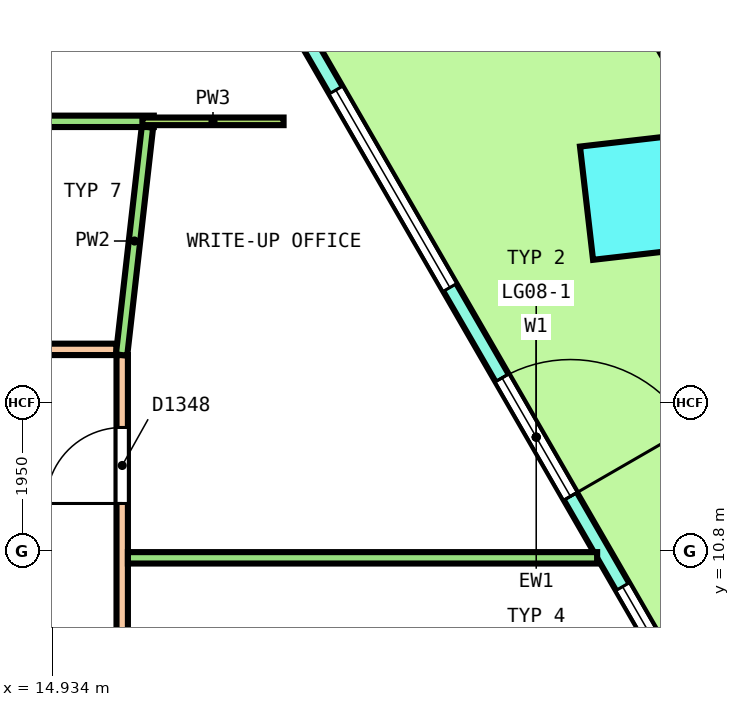
"""IFC4 building model, lengths in metres.
Left out: names, types, materials, properties, quantities, classifications, styles, units other than length and angle.
Written with IfcOpenShell. Run it as: python <this file> out.ifc"""

import sys

from ifc_helpers import new_model, si_unit, direction, frame, frame_2d, origin, origin_2d, place, context, subcontext, project, spatial, polyline, rectangle, outline, extrude, element, fill, save


model = new_model("IFC4")
c1 = context("Model", 3, precision=1e-05, world=origin(), true_north=direction((0.0, 1.0)))
c2 = subcontext(c1, "Body", "Model", "MODEL_VIEW")
j1 = project(units=[si_unit("LENGTHUNIT", "METRE"), si_unit("PLANEANGLEUNIT", "RADIAN")], contexts=[c1])
p1 = place(None, origin())
s1 = spatial("IfcSite", under=j1, at=p1, CompositionType="ELEMENT")
p2 = place(p1, origin())
s2 = spatial("IfcBuilding", under=s1, at=p2, CompositionType="ELEMENT")
p3 = place(p2, frame((0.0, 0.0, 36.6)))
s3 = spatial("IfcBuildingStorey", under=s2, at=p3, CompositionType="ELEMENT", Elevation=36.6)
p4 = place(p3, frame((22.704, 15.459, 0.0), z_axis=(0.028982383936, 0.01259317722, 0.99950059195), x_axis=(-0.500965863044, 0.865459464324, 0.003622109482)))
e1 = element("IfcColumn", 1, at=p4, inside=s3, PredefinedType="COLUMN", context=c2, shape_type="SweptSolid", body=[
    extrude(rectangle(XDim=1.5, YDim=1.5, at=origin_2d()), origin(), (0.0, 0.0, 1.0), 4.052),
])
p5 = place(p3, frame((26.012, 4.129, 0.0), z_axis=(0.0, 0.0, 1.0), x_axis=(-0.499999588275, 0.866025641494, 0.0)))
e2 = element("IfcWall", 2, at=p5, inside=s3, PredefinedType="SOLIDWALL", context=c2, shape_type="SweptSolid", body=[
    extrude(outline(polyline([(-0.027, -0.1), (1.024, -0.1), (2.075, -0.1), (3.125, -0.1), (4.176, -0.1), (5.227, -0.1), (6.278, -0.1), (7.329, -0.1), (8.38, -0.1), (9.43, -0.1), (10.481, -0.1), (11.532, -0.1), (12.583, -0.1), (13.634, -0.1), (14.685, -0.1), (15.735, -0.1), (16.786, -0.1), (17.837, -0.1), (18.888, -0.1), (18.834, 0.1), (17.789, 0.1), (16.744, 0.1), (15.699, 0.1), (14.655, 0.1), (13.61, 0.1), (12.565, 0.1), (11.52, 0.1), (10.475, 0.1), (9.43, 0.1), (8.385, 0.1), (7.341, 0.1), (6.296, 0.1), (5.251, 0.1), (4.206, 0.1), (3.161, 0.1), (2.116, 0.1), (1.072, 0.1), (0.027, 0.1), (-0.027, -0.1)])), origin(), (0.0, 0.0, 1.0), 4.1),
])
p6 = place(p5, frame((0.386, 0.0, 0.1)))
e3 = element("IfcOpeningElement", 3, at=p6, cuts=e2, PredefinedType="OPENING", context=c2, shape_type="SweptSolid", body=[
    extrude(rectangle(XDim=3.0, YDim=2.9, at=frame_2d((1.5, 1.45))), frame((0.0, 0.11, 0.0), z_axis=(0.0, -1.0, 0.0), x_axis=(1.0, 0.0, 0.0)), (0.0, 0.0, 1.0), 0.22),
])
p7 = place(p5, frame((4.158, 0.0, 0.1)))
e4 = element("IfcOpeningElement", 4, at=p7, cuts=e2, PredefinedType="OPENING", context=c2, shape_type="SweptSolid", body=[
    extrude(rectangle(XDim=3.0, YDim=2.9, at=frame_2d((1.5, 1.45))), frame((0.0, 0.11, 0.0), z_axis=(0.0, -1.0, 0.0), x_axis=(1.0, 0.0, 0.0)), (0.0, 0.0, 1.0), 0.22),
])
p8 = place(p5, frame((8.531, 0.0, 0.0)))
e5 = element("IfcOpeningElement", 5, at=p8, cuts=e2, PredefinedType="OPENING", context=c2, shape_type="SweptSolid", body=[
    extrude(rectangle(XDim=1.8, YDim=2.4, at=frame_2d((0.9, 1.2))), frame((0.0, 0.11, 0.0), z_axis=(0.0, -1.0, 0.0), x_axis=(1.0, 0.0, 0.0)), (0.0, 0.0, 1.0), 0.22),
])
p9 = place(p5, frame((8.531, 0.0, 2.55)))
e6 = element("IfcOpeningElement", 6, at=p9, cuts=e2, PredefinedType="OPENING", context=c2, shape_type="SweptSolid", body=[
    extrude(rectangle(XDim=1.8, YDim=0.45, at=frame_2d((0.9, 0.225))), frame((0.0, 0.11, 0.0), z_axis=(0.0, -1.0, 0.0), x_axis=(1.0, 0.0, 0.0)), (0.0, 0.0, 1.0), 0.22),
])
p10 = place(p5, frame((11.703, 0.0, 0.1)))
e7 = element("IfcOpeningElement", 7, at=p10, cuts=e2, PredefinedType="OPENING", context=c2, shape_type="SweptSolid", body=[
    extrude(rectangle(XDim=3.0, YDim=2.9, at=frame_2d((1.5, 1.45))), frame((0.0, 0.11, 0.0), z_axis=(0.0, -1.0, 0.0), x_axis=(1.0, 0.0, 0.0)), (0.0, 0.0, 1.0), 0.22),
])
p11 = place(p5, frame((15.475, 0.0, 0.1)))
e8 = element("IfcOpeningElement", 8, at=p11, cuts=e2, PredefinedType="OPENING", context=c2, shape_type="SweptSolid", body=[
    extrude(rectangle(XDim=3.0, YDim=2.9, at=frame_2d((1.5, 1.45))), frame((0.0, 0.11, 0.0), z_axis=(0.0, -1.0, 0.0), x_axis=(1.0, 0.0, 0.0)), (0.0, 0.0, 1.0), 0.22),
])
p12 = place(p3, frame((15.85, -13.375, 0.0), z_axis=(0.0, 0.0, 1.0), x_axis=(0.0, 1.0, 0.0)))
e9 = element("IfcWall", 9, at=p12, inside=s3, PredefinedType="PARTITIONING", context=c2, shape_type="SweptSolid", body=[
    extrude(rectangle(XDim=26.75, YDim=0.15, at=frame_2d((13.375, 0.0))), origin(), (0.0, 0.0, 1.0), 3.05),
])
p13 = place(p12, frame((14.351, 0.0, 0.0)))
e10 = element("IfcOpeningElement", 10, at=p13, cuts=e9, PredefinedType="OPENING", context=c2, shape_type="SweptSolid", body=[
    extrude(rectangle(XDim=1.0, YDim=2.1, at=frame_2d((0.5, 1.05))), frame((0.0, 0.085, 0.0), z_axis=(0.0, -1.0, 0.0), x_axis=(1.0, 0.0, 0.0)), (0.0, 0.0, 1.0), 0.17),
])
p14 = place(p12, frame((18.775, 0.0, 0.0)))
e11 = element("IfcOpeningElement", 11, at=p14, cuts=e9, PredefinedType="OPENING", context=c2, shape_type="SweptSolid", body=[
    extrude(rectangle(XDim=1.2, YDim=2.1, at=frame_2d((0.6, 1.05))), frame((0.0, 0.085, 0.0), z_axis=(0.0, -1.0, 0.0), x_axis=(1.0, 0.0, 0.0)), (0.0, 0.0, 1.0), 0.17),
])
p15 = place(p12, frame((24.798, 0.0, 0.0)))
e12 = element("IfcOpeningElement", 12, at=p15, cuts=e9, PredefinedType="OPENING", context=c2, shape_type="SweptSolid", body=[
    extrude(rectangle(XDim=1.0, YDim=2.1, at=frame_2d((0.5, 1.05))), frame((0.0, 0.085, 0.0), z_axis=(0.0, -1.0, 0.0), x_axis=(1.0, 0.0, 0.0)), (0.0, 0.0, 1.0), 0.17),
])
p16 = place(p12, frame((1.472, 0.0, 0.0)))
e13 = element("IfcOpeningElement", 13, at=p16, cuts=e9, PredefinedType="OPENING", context=c2, shape_type="SweptSolid", body=[
    extrude(rectangle(XDim=1.0, YDim=2.1, at=frame_2d((0.5, 1.05))), frame((0.0, 0.085, 0.0), z_axis=(0.0, -1.0, 0.0), x_axis=(1.0, 0.0, 0.0)), (0.0, 0.0, 1.0), 0.17),
])
p17 = place(p12, frame((4.865, 0.0, 0.0)))
e14 = element("IfcOpeningElement", 14, at=p17, cuts=e9, PredefinedType="OPENING", context=c2, shape_type="SweptSolid", body=[
    extrude(rectangle(XDim=1.0, YDim=2.1, at=frame_2d((0.5, 1.05))), frame((0.0, 0.085, 0.0), z_axis=(0.0, -1.0, 0.0), x_axis=(1.0, 0.0, 0.0)), (0.0, 0.0, 1.0), 0.17),
])
p18 = place(p12, frame((8.754, 0.0, 0.0)))
e15 = element("IfcOpeningElement", 15, at=p18, cuts=e9, PredefinedType="OPENING", context=c2, shape_type="SweptSolid", body=[
    extrude(rectangle(XDim=1.0, YDim=2.1, at=frame_2d((0.5, 1.05))), frame((0.0, 0.085, 0.0), z_axis=(0.0, -1.0, 0.0), x_axis=(1.0, 0.0, 0.0)), (0.0, 0.0, 1.0), 0.17),
])
p19 = place(p3, frame((-15.775, 13.45, 0.0), z_axis=(0.0, 0.0, 1.0), x_axis=(1.0, 0.0, 0.0)))
e16 = element("IfcWall", 16, at=p19, inside=s3, PredefinedType="PARTITIONING", context=c2, shape_type="SweptSolid", body=[
    extrude(rectangle(XDim=31.55, YDim=0.15, at=frame_2d((15.775, 0.0))), origin(), (0.0, 0.0, 1.0), 3.05),
])
p20 = place(p19, frame((28.527, 0.0, 0.0)))
e17 = element("IfcOpeningElement", 17, at=p20, cuts=e16, PredefinedType="OPENING", context=c2, shape_type="SweptSolid", body=[
    extrude(rectangle(XDim=1.0, YDim=2.1, at=frame_2d((0.5, 1.05))), frame((0.0, 0.085, 0.0), z_axis=(0.0, -1.0, 0.0), x_axis=(1.0, 0.0, 0.0)), (0.0, 0.0, 1.0), 0.17),
])
p21 = place(p19, frame((24.289, 0.0, 0.0)))
e18 = element("IfcOpeningElement", 18, at=p21, cuts=e16, PredefinedType="OPENING", context=c2, shape_type="SweptSolid", body=[
    extrude(rectangle(XDim=1.2, YDim=2.1, at=frame_2d((0.6, 1.05))), frame((0.0, 0.085, 0.0), z_axis=(0.0, -1.0, 0.0), x_axis=(1.0, 0.0, 0.0)), (0.0, 0.0, 1.0), 0.17),
])
p22 = place(p19, frame((18.429, 0.0, 0.0)))
e19 = element("IfcOpeningElement", 19, at=p22, cuts=e16, PredefinedType="OPENING", context=c2, shape_type="SweptSolid", body=[
    extrude(rectangle(XDim=1.0, YDim=2.1, at=frame_2d((0.5, 1.05))), frame((0.0, 0.085, 0.0), z_axis=(0.0, -1.0, 0.0), x_axis=(1.0, 0.0, 0.0)), (0.0, 0.0, 1.0), 0.17),
])
p23 = place(p19, frame((3.23, 0.0, 0.0)))
e20 = element("IfcOpeningElement", 20, at=p23, cuts=e16, PredefinedType="OPENING", context=c2, shape_type="SweptSolid", body=[
    extrude(rectangle(XDim=1.2, YDim=2.1, at=frame_2d((0.6, 1.05))), frame((0.0, 0.085, 0.0), z_axis=(0.0, -1.0, 0.0), x_axis=(1.0, 0.0, 0.0)), (0.0, 0.0, 1.0), 0.17),
])
p24 = place(p3, frame((15.925, 10.708, 0.0), z_axis=(0.0, 0.0, 1.0), x_axis=(1.0, 0.0, 0.0)))
e21 = element("IfcWall", 21, at=p24, inside=s3, PredefinedType="PARTITIONING", context=c2, shape_type="SweptSolid", body=[
    extrude(rectangle(XDim=6.173, YDim=0.15, at=frame_2d((3.086, 0.0))), origin(), (0.0, 0.0, 1.0), 3.05),
])
p25 = place(p3, frame((15.842, 13.375, 0.0), z_axis=(0.0, 0.0, 1.0), x_axis=(0.112800828348, 0.993617619169, 0.0)))
e22 = element("IfcWall", 22, at=p25, inside=s3, PredefinedType="PARTITIONING", context=c2, shape_type="SweptSolid", body=[
    extrude(rectangle(XDim=3.019, YDim=0.15, at=frame_2d((1.51, 0.0))), origin(), (0.0, 0.0, 1.0), 3.05),
])
p26 = place(p3, frame((10.73, 16.45, 0.0), z_axis=(0.0, 0.0, 1.0), x_axis=(1.0, 0.0, 0.0)))
e23 = element("IfcWall", 23, at=p26, inside=s3, PredefinedType="PARTITIONING", context=c2, shape_type="SweptSolid", body=[
    extrude(rectangle(XDim=5.536, YDim=0.15, at=frame_2d((2.768, 0.0))), origin(), (0.0, 0.0, 1.0), 3.05),
])
p27 = place(p26, frame((2.768, 0.0, 0.0)))
e24 = element("IfcOpeningElement", 24, at=p27, cuts=e23, PredefinedType="OPENING", context=c2, shape_type="SweptSolid", body=[
    extrude(rectangle(XDim=1.0, YDim=2.1, at=frame_2d((0.5, 1.05))), frame((0.0, 0.085, 0.0), z_axis=(0.0, -1.0, 0.0), x_axis=(1.0, 0.0, 0.0)), (0.0, 0.0, 1.0), 0.17),
])
p28 = place(p3, frame((16.116, 16.45, 0.0), z_axis=(0.0, 0.0, 1.0), x_axis=(1.0, 0.0, 0.0)))
e25 = element("IfcWall", 25, at=p28, inside=s3, PredefinedType="PARTITIONING", context=c2, shape_type="SweptSolid", body=[
    extrude(rectangle(XDim=1.857, YDim=0.1, at=frame_2d((0.929, 0.0))), origin(), (0.0, 0.0, 1.0), 3.05),
])
p29 = place(p7, origin())
e26 = element("IfcWindow", 26, at=p29, inside=s3, PartitioningType="SINGLE_PANEL", PredefinedType="WINDOW", context=c2, shape_type="SweptSolid", body=[
    extrude(rectangle(XDim=3.0, YDim=2.9, at=frame_2d((1.5, 1.45))), frame((0.0, 0.03, 0.0), z_axis=(0.0, -1.0, 0.0), x_axis=(1.0, 0.0, 0.0)), (0.0, 0.0, 1.0), 0.06),
])
fill(e4, e26)
p30 = place(p8, origin())
e27 = element("IfcDoor", 27, at=p30, inside=s3, OperationType="DOUBLE_DOOR_SINGLE_SWING", PredefinedType="DOOR", context=c2, shape_type="SweptSolid", body=[
    extrude(rectangle(XDim=1.8, YDim=2.4, at=frame_2d((0.9, 1.2))), frame((0.0, 0.025, 0.0), z_axis=(0.0, -1.0, 0.0), x_axis=(1.0, 0.0, 0.0)), (0.0, 0.0, 1.0), 0.05),
])
fill(e5, e27)
p31 = place(p9, origin())
e28 = element("IfcWindow", 28, at=p31, inside=s3, PartitioningType="SINGLE_PANEL", PredefinedType="WINDOW", context=c2, shape_type="SweptSolid", body=[
    extrude(rectangle(XDim=1.8, YDim=0.45, at=frame_2d((0.9, 0.225))), frame((0.0, 0.03, 0.0), z_axis=(0.0, -1.0, 0.0), x_axis=(1.0, 0.0, 0.0)), (0.0, 0.0, 1.0), 0.06),
])
fill(e6, e28)
p32 = place(p10, origin())
e29 = element("IfcWindow", 29, at=p32, inside=s3, PartitioningType="SINGLE_PANEL", PredefinedType="WINDOW", context=c2, shape_type="SweptSolid", body=[
    extrude(rectangle(XDim=3.0, YDim=2.9, at=frame_2d((1.5, 1.45))), frame((0.0, 0.03, 0.0), z_axis=(0.0, -1.0, 0.0), x_axis=(1.0, 0.0, 0.0)), (0.0, 0.0, 1.0), 0.06),
])
fill(e7, e29)
p33 = place(p15, origin())
e30 = element("IfcDoor", 30, at=p33, inside=s3, OperationType="SINGLE_SWING_LEFT", PredefinedType="DOOR", context=c2, shape_type="SweptSolid", body=[
    extrude(rectangle(XDim=1.0, YDim=2.1, at=frame_2d((0.5, 1.05))), frame((0.0, 0.025, 0.0), z_axis=(0.0, -1.0, 0.0), x_axis=(1.0, 0.0, 0.0)), (0.0, 0.0, 1.0), 0.05),
])
fill(e12, e30)
save(model, sys.argv[1])
